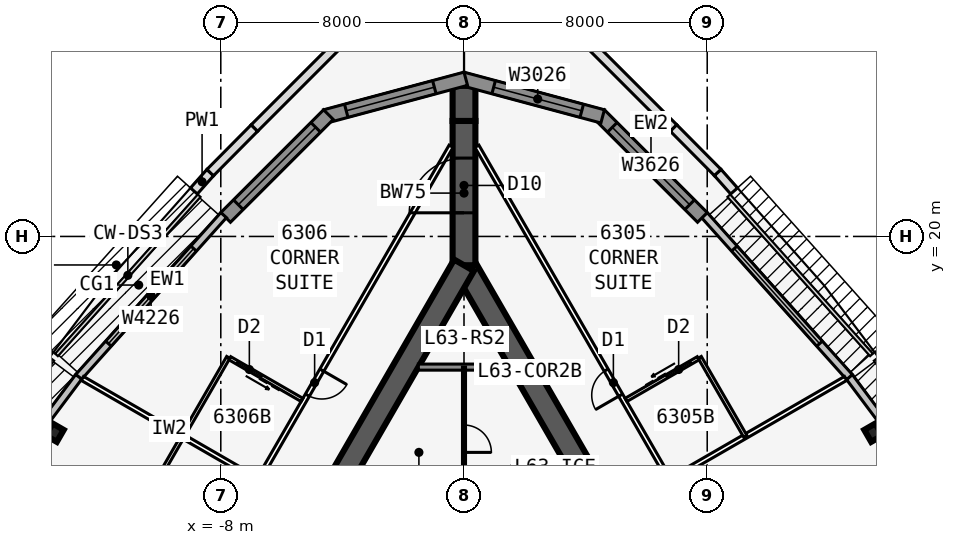
"""IFC4 building model, lengths in metres.
Left out: names, types, materials, properties, quantities, classifications, styles, units other than length and angle.
Written with IfcOpenShell. Run it as: python <this file> out.ifc"""

import sys

from ifc_helpers import new_model, si_unit, direction, frame, frame_2d, origin, origin_2d, place, context, subcontext, project, spatial, polyline, rectangle, i_section, outline, extrude, element, fill, save


model = new_model("IFC4")
c1 = context("Model", 3, precision=1e-05, world=origin(), true_north=direction((0.0, 1.0)))
c2 = subcontext(c1, "Body", "Model", "MODEL_VIEW")
j1 = project(units=[si_unit("LENGTHUNIT", "METRE"), si_unit("PLANEANGLEUNIT", "RADIAN")], contexts=[c1])
p1 = place(None, origin())
s1 = spatial("IfcSite", under=j1, at=p1, CompositionType="ELEMENT")
p2 = place(p1, origin())
s2 = spatial("IfcBuilding", under=s1, at=p2, CompositionType="ELEMENT")
p3 = place(p2, frame((0.0, 0.0, 239.3)))
s3 = spatial("IfcBuildingStorey", under=s2, at=p3, CompositionType="ELEMENT", Elevation=239.3)
p4 = place(p3, frame((16.5, -9.526, 0.0), z_axis=(0.0, 0.0, 1.0), x_axis=(-0.499999749417, 0.866025548458, 0.0)))
e1 = element("IfcWall", 1, at=p4, inside=s3, PredefinedType="SHEAR", context=c2, shape_type="SweptSolid", body=[
    extrude(rectangle(XDim=33.0, YDim=0.75, at=frame_2d((16.5, 0.0))), origin(), (0.0, 0.0, 1.0), 3.6),
])
p5 = place(p4, frame((14.15, 0.0, 0.0)))
e2 = element("IfcOpeningElement", 2, at=p5, cuts=e1, PredefinedType="OPENING", context=c2, shape_type="SweptSolid", body=[
    extrude(rectangle(XDim=1.8, YDim=2.13, at=frame_2d((0.9, 1.065))), frame((0.0, 0.385, 0.0), z_axis=(0.0, -1.0, 0.0), x_axis=(1.0, 0.0, 0.0)), (0.0, 0.0, 1.0), 0.77),
])
p6 = place(p4, frame((12.6, 0.0, 0.0)))
e3 = element("IfcOpeningElement", 3, at=p6, cuts=e1, PredefinedType="OPENING", context=c2, shape_type="SweptSolid", body=[
    extrude(rectangle(XDim=1.0, YDim=2.13, at=frame_2d((0.5, 1.065))), frame((0.0, 0.385, 0.0), z_axis=(0.0, -1.0, 0.0), x_axis=(1.0, 0.0, 0.0)), (0.0, 0.0, 1.0), 0.77),
])
p7 = place(p3, frame((0.0, 19.052, 0.0), z_axis=(0.0, 0.0, 1.0), x_axis=(-0.499999749417, -0.866025548458, 0.0)))
e4 = element("IfcWall", 4, at=p7, inside=s3, PredefinedType="SHEAR", context=c2, shape_type="SweptSolid", body=[
    extrude(rectangle(XDim=33.0, YDim=0.75, at=frame_2d((16.5, 0.0))), origin(), (0.0, 0.0, 1.0), 3.6),
])
p8 = place(p7, frame((14.15, 0.0, 0.0)))
e5 = element("IfcOpeningElement", 5, at=p8, cuts=e4, PredefinedType="OPENING", context=c2, shape_type="SweptSolid", body=[
    extrude(rectangle(XDim=1.8, YDim=2.13, at=frame_2d((0.9, 1.065))), frame((0.0, 0.385, 0.0), z_axis=(0.0, -1.0, 0.0), x_axis=(1.0, 0.0, 0.0)), (0.0, 0.0, 1.0), 0.77),
])
p9 = place(p7, frame((12.6, 0.0, 0.0)))
e6 = element("IfcOpeningElement", 6, at=p9, cuts=e4, PredefinedType="OPENING", context=c2, shape_type="SweptSolid", body=[
    extrude(rectangle(XDim=1.0, YDim=2.13, at=frame_2d((0.5, 1.065))), frame((0.0, 0.385, 0.0), z_axis=(0.0, -1.0, 0.0), x_axis=(1.0, 0.0, 0.0)), (0.0, 0.0, 1.0), 0.77),
])
p10 = place(p3, frame((0.0, 19.052, 0.0), z_axis=(0.0, 0.0, 1.0), x_axis=(0.0, 1.0, 0.0)))
e7 = element("IfcWall", 7, at=p10, inside=s3, PredefinedType="SHEAR", context=c2, shape_type="SweptSolid", body=[
    extrude(rectangle(XDim=4.746, YDim=0.75, at=frame_2d((2.373, 0.0))), origin(), (0.0, 0.0, 1.0), 3.6),
])
p11 = place(p10, frame((1.725, 0.0, 0.0)))
e8 = element("IfcOpeningElement", 8, at=p11, cuts=e7, PredefinedType="OPENING", context=c2, shape_type="SweptSolid", body=[
    extrude(rectangle(XDim=1.8, YDim=2.13, at=frame_2d((0.9, 1.065))), frame((0.0, 0.385, 0.0), z_axis=(0.0, -1.0, 0.0), x_axis=(1.0, 0.0, 0.0)), (0.0, 0.0, 1.0), 0.77),
])
p12 = place(p3, frame((0.0, 23.799, 0.0), z_axis=(0.0, 0.0, 1.0), x_axis=(0.0, 1.0, 0.0)))
e9 = element("IfcWall", 9, at=p12, inside=s3, PredefinedType="SHEAR", context=c2, shape_type="SweptSolid", body=[
    extrude(rectangle(XDim=1.155, YDim=0.75, at=frame_2d((0.577, 0.0))), origin(), (0.0, 0.0, 1.0), 3.6),
])
for number, where, z_axis, x_axis in (
    (10, (13.461, 13.545, 0.0), (0.0, 0.0, 1.0), (0.866, 0.5, 0.0)),
    (11, (-13.461, 13.545, 0.0), (0.0, 0.0, 1.0), (-0.866, 0.5, 0.0)),
):
    element("IfcColumn", number, at=place(p3, frame(where, z_axis=z_axis, x_axis=x_axis)), inside=s3, PredefinedType="COLUMN", context=c2, shape_type="SweptSolid", body=[
        extrude(i_section(OverallWidth=0.419, OverallDepth=0.455, WebThickness=0.042, FlangeThickness=0.068, at=origin_2d()), origin(), (0.0, 0.0, 1.0), 3.6),
    ])
p13 = place(p3, frame((13.881, 13.771, 0.0), z_axis=(0.0, 0.0, 1.0), x_axis=(-0.599650843534, 0.800261748335, 0.0)))
e12 = element("IfcWall", 12, at=p13, inside=s3, PredefinedType="STANDARD", context=c2, shape_type="SweptSolid", body=[
    extrude(rectangle(XDim=2.014, YDim=0.25, at=frame_2d((1.007, 0.0))), origin(), (0.0, 0.0, 1.0), 3.435),
])
p14 = place(p3, frame((12.68, 15.374, 0.0), z_axis=(0.0, 0.0, 1.0), x_axis=(-0.667303550892, 0.744785855778, 0.0)))
e13 = element("IfcWall", 13, at=p14, inside=s3, PredefinedType="STANDARD", context=c2, shape_type="SweptSolid", body=[
    extrude(rectangle(XDim=7.153, YDim=0.25, at=frame_2d((3.576, 0.0))), origin(), (0.0, 0.0, 1.0), 3.435),
])
p15 = place(p14, frame((1.476, 0.0, 0.45)))
e14 = element("IfcOpeningElement", 14, at=p15, cuts=e13, PredefinedType="OPENING", context=c2, shape_type="SweptSolid", body=[
    extrude(rectangle(XDim=4.2, YDim=2.6, at=frame_2d((2.1, 1.3))), frame((0.0, 0.135, 0.0), z_axis=(0.0, -1.0, 0.0), x_axis=(1.0, 0.0, 0.0)), (0.0, 0.0, 1.0), 0.27),
])
p16 = place(p3, frame((7.841, 20.625, 0.0), z_axis=(0.0, 0.0, 1.0), x_axis=(-0.707106781187, 0.707106781187, 0.0)))
e15 = element("IfcWall", 15, at=p16, inside=s3, PredefinedType="SOLIDWALL", context=c2, shape_type="SweptSolid", body=[
    extrude(rectangle(XDim=4.781, YDim=0.45, at=frame_2d((2.391, 0.0))), origin(), (0.0, 0.0, 1.0), 3.435),
])
p17 = place(p16, frame((0.591, 0.0, 0.45)))
e16 = element("IfcOpeningElement", 16, at=p17, cuts=e15, PredefinedType="OPENING", context=c2, shape_type="SweptSolid", body=[
    extrude(rectangle(XDim=3.6, YDim=2.6, at=frame_2d((1.8, 1.3))), frame((0.0, 0.235, 0.0), z_axis=(0.0, -1.0, 0.0), x_axis=(1.0, 0.0, 0.0)), (0.0, 0.0, 1.0), 0.47),
])
p18 = place(p3, frame((4.561, 23.948, 0.0), z_axis=(0.0, 0.0, 1.0), x_axis=(-0.965926628191, 0.258816052347, 0.0)))
e17 = element("IfcWall", 17, at=p18, inside=s3, PredefinedType="SOLIDWALL", context=c2, shape_type="SweptSolid", body=[
    extrude(outline(polyline([(4.781, 0.225), (4.722, 0.225), (4.303, 0.113), (4.273, 0.225), (0.0, 0.225), (0.0, -0.225), (4.781, -0.225), (4.781, 0.225)])), origin(), (0.0, 0.0, 1.0), 3.435),
])
p19 = place(p18, frame((0.711, 0.0, 0.45)))
e18 = element("IfcOpeningElement", 18, at=p19, cuts=e17, PredefinedType="OPENING", context=c2, shape_type="SweptSolid", body=[
    extrude(rectangle(XDim=3.0, YDim=2.6, at=frame_2d((1.5, 1.3))), frame((0.0, 0.235, 0.0), z_axis=(0.0, -1.0, 0.0), x_axis=(1.0, 0.0, 0.0)), (0.0, 0.0, 1.0), 0.47),
])
p20 = place(p3, frame((0.058, 25.186, 0.0), z_axis=(0.0, 0.0, 1.0), x_axis=(-0.965926628191, -0.258816052347, 0.0)))
e19 = element("IfcWall", 19, at=p20, inside=s3, PredefinedType="SOLIDWALL", context=c2, shape_type="SweptSolid", body=[
    extrude(outline(polyline([(4.781, 0.225), (0.509, 0.225), (0.479, 0.113), (0.059, 0.225), (0.0, 0.225), (0.0, -0.225), (4.781, -0.225), (4.781, 0.225)])), origin(), (0.0, 0.0, 1.0), 3.435),
])
p21 = place(p20, frame((1.07, 0.0, 0.45)))
e20 = element("IfcOpeningElement", 20, at=p21, cuts=e19, PredefinedType="OPENING", context=c2, shape_type="SweptSolid", body=[
    extrude(rectangle(XDim=3.0, YDim=2.6, at=frame_2d((1.5, 1.3))), frame((0.0, 0.235, 0.0), z_axis=(0.0, -1.0, 0.0), x_axis=(1.0, 0.0, 0.0)), (0.0, 0.0, 1.0), 0.47),
])
p22 = place(p3, frame((-4.46, 24.007, 0.0), z_axis=(0.0, 0.0, 1.0), x_axis=(-0.707106781187, -0.707106781187, 0.0)))
e21 = element("IfcWall", 21, at=p22, inside=s3, PredefinedType="SOLIDWALL", context=c2, shape_type="SweptSolid", body=[
    extrude(rectangle(XDim=4.781, YDim=0.45, at=frame_2d((2.391, 0.0))), origin(), (0.0, 0.0, 1.0), 3.435),
])
p23 = place(p22, frame((0.591, 0.0, 0.45)))
e22 = element("IfcOpeningElement", 22, at=p23, cuts=e21, PredefinedType="OPENING", context=c2, shape_type="SweptSolid", body=[
    extrude(rectangle(XDim=3.6, YDim=2.6, at=frame_2d((1.8, 1.3))), frame((0.0, 0.235, 0.0), z_axis=(0.0, -1.0, 0.0), x_axis=(1.0, 0.0, 0.0)), (0.0, 0.0, 1.0), 0.47),
])
p24 = place(p3, frame((-7.907, 20.701, 0.0), z_axis=(0.0, 0.0, 1.0), x_axis=(-0.667303550892, -0.744785855778, 0.0)))
e23 = element("IfcWall", 23, at=p24, inside=s3, PredefinedType="STANDARD", context=c2, shape_type="SweptSolid", body=[
    extrude(rectangle(XDim=7.153, YDim=0.25, at=frame_2d((3.576, 0.0))), origin(), (0.0, 0.0, 1.0), 3.435),
])
p25 = place(p24, frame((1.476, 0.0, 0.45)))
e24 = element("IfcOpeningElement", 24, at=p25, cuts=e23, PredefinedType="OPENING", context=c2, shape_type="SweptSolid", body=[
    extrude(rectangle(XDim=4.2, YDim=2.6, at=frame_2d((2.1, 1.3))), frame((0.0, 0.135, 0.0), z_axis=(0.0, -1.0, 0.0), x_axis=(1.0, 0.0, 0.0)), (0.0, 0.0, 1.0), 0.27),
])
p26 = place(p3, frame((-12.673, 15.382, 0.0), z_axis=(0.0, 0.0, 1.0), x_axis=(-0.599650843534, -0.800261748335, 0.0)))
e25 = element("IfcWall", 25, at=p26, inside=s3, PredefinedType="STANDARD", context=c2, shape_type="SweptSolid", body=[
    extrude(rectangle(XDim=2.014, YDim=0.25, at=frame_2d((1.007, 0.0))), origin(), (0.0, 0.0, 1.0), 3.435),
])
p27 = place(p3, frame((-8.884, 21.496, 0.0), z_axis=(0.0, 0.0, 1.0), x_axis=(0.664345086819, 0.747425986717, 0.0)))
e26 = element("IfcWall", 26, at=p27, inside=s3, PredefinedType="PARAPET", context=c2, shape_type="SweptSolid", body=[
    extrude(rectangle(XDim=0.808, YDim=0.3, at=frame_2d((0.404, 0.0))), origin(), (0.0, 0.0, 1.0), 1.1),
])
p28 = place(p3, frame((-8.347, 22.1, 0.0), z_axis=(0.0, 0.0, 1.0), x_axis=(0.704083858744, 0.710116835356, 0.0)))
e27 = element("IfcWall", 27, at=p28, inside=s3, PredefinedType="PARAPET", context=c2, shape_type="SweptSolid", body=[
    extrude(rectangle(XDim=2.064, YDim=0.3, at=frame_2d((1.032, 0.0))), origin(), (0.0, 0.0, 1.0), 1.1),
])
for number, where, z_axis, x_axis in (
    (28, (-6.894, 23.566, 0.0), (0.0, 0.0, 1.0), (0.707, 0.707, 0.0)),
    (29, (3.964, 26.495, 0.0), (0.0, 0.0, 1.0), (0.707, -0.707, 0.0)),
):
    element("IfcWall", number, at=place(p3, frame(where, z_axis=z_axis, x_axis=x_axis)), inside=s3, PredefinedType="PARAPET", context=c2, shape_type="SweptSolid", body=[
        extrude(rectangle(XDim=4.143, YDim=0.3, at=frame_2d((2.072, 0.0))), origin(), (0.0, 0.0, 1.0), 1.1),
    ])
p29 = place(p3, frame((6.894, 23.566, 0.0), z_axis=(0.0, 0.0, 1.0), x_axis=(0.704083858744, -0.710116835356, 0.0)))
e30 = element("IfcWall", 30, at=p29, inside=s3, PredefinedType="PARAPET", context=c2, shape_type="SweptSolid", body=[
    extrude(rectangle(XDim=2.064, YDim=0.3, at=frame_2d((1.032, 0.0))), origin(), (0.0, 0.0, 1.0), 1.1),
])
p30 = place(p3, frame((8.347, 22.1, 0.0), z_axis=(0.0, 0.0, 1.0), x_axis=(0.664345086819, -0.747425986717, 0.0)))
e31 = element("IfcWall", 31, at=p30, inside=s3, PredefinedType="PARAPET", context=c2, shape_type="SweptSolid", body=[
    extrude(rectangle(XDim=0.808, YDim=0.3, at=frame_2d((0.404, 0.0))), origin(), (0.0, 0.0, 1.0), 1.1),
])
p31 = place(p3, frame((6.763, 11.988, 0.0), z_axis=(0.0, 0.0, 1.0), x_axis=(-0.49999585592, 0.866027796357, 0.0)))
e32 = element("IfcWall", 32, at=p31, inside=s3, PredefinedType="PARTITIONING", context=c2, shape_type="SweptSolid", body=[
    extrude(rectangle(XDim=12.677, YDim=0.15, at=frame_2d((6.338, 0.0))), origin(), (0.0, 0.0, 1.0), 3.435),
])
p32 = place(p31, frame((3.225, 0.0, 0.0)))
e33 = element("IfcOpeningElement", 33, at=p32, cuts=e32, PredefinedType="OPENING", context=c2, shape_type="SweptSolid", body=[
    extrude(rectangle(XDim=0.95, YDim=2.13, at=frame_2d((0.475, 1.065))), frame((0.0, 0.085, 0.0), z_axis=(0.0, -1.0, 0.0), x_axis=(1.0, 0.0, 0.0)), (0.0, 0.0, 1.0), 0.17),
])
p33 = place(p3, frame((6.829, 12.025, 0.0), z_axis=(0.0, 0.0, 1.0), x_axis=(0.866029323189, 0.499993211332, 0.0)))
e34 = element("IfcWall", 34, at=p33, inside=s3, PredefinedType="PARTITIONING", context=c2, shape_type="SweptSolid", body=[
    extrude(rectangle(XDim=6.608, YDim=0.15, at=frame_2d((3.304, 0.0))), origin(), (0.0, 0.0, 1.0), 2.678),
])
p34 = place(p3, frame((9.253, 13.425, 0.0), z_axis=(0.0, 0.0, 1.0), x_axis=(-0.499990139034, 0.866031096941, 0.0)))
e35 = element("IfcWall", 35, at=p34, inside=s3, PredefinedType="PLUMBINGWALL", context=c2, shape_type="SweptSolid", body=[
    extrude(rectangle(XDim=3.0, YDim=0.12, at=frame_2d((1.5, 0.0))), origin(), (0.0, 0.0, 1.0), 3.435),
])
p35 = place(p3, frame((5.329, 14.623, 0.0), z_axis=(0.0, 0.0, 1.0), x_axis=(0.865997131366, 0.500048966069, 0.0)))
e36 = element("IfcWall", 36, at=p35, inside=s3, PredefinedType="PLUMBINGWALL", context=c2, shape_type="SweptSolid", body=[
    extrude(rectangle(XDim=2.74, YDim=0.12, at=frame_2d((1.37, 0.0))), origin(), (0.0, 0.0, 1.0), 3.435),
])
p36 = place(p35, frame((1.55, 0.0, 0.0)))
e37 = element("IfcOpeningElement", 37, at=p36, cuts=e36, PredefinedType="OPENING", context=c2, shape_type="SweptSolid", body=[
    extrude(rectangle(XDim=0.9, YDim=2.13, at=frame_2d((0.45, 1.065))), frame((0.0, 0.07, 0.0), z_axis=(0.0, -1.0, 0.0), x_axis=(1.0, 0.0, 0.0)), (0.0, 0.0, 1.0), 0.14),
])
p37 = place(p3, frame((-0.425, 22.966, 0.0), z_axis=(0.0, 0.0, 1.0), x_axis=(-0.500000265775, -0.866025250339, 0.0)))
e38 = element("IfcWall", 38, at=p37, inside=s3, PredefinedType="PARTITIONING", context=c2, shape_type="SweptSolid", body=[
    extrude(rectangle(XDim=39.354, YDim=0.15, at=frame_2d((19.677, 0.0))), origin(), (0.0, 0.0, 1.0), 3.435),
])
p38 = place(p37, frame((8.502, 0.0, 0.0)))
e39 = element("IfcOpeningElement", 39, at=p38, cuts=e38, PredefinedType="OPENING", context=c2, shape_type="SweptSolid", body=[
    extrude(rectangle(XDim=0.95, YDim=2.13, at=frame_2d((0.475, 1.065))), frame((0.0, 0.085, 0.0), z_axis=(0.0, -1.0, 0.0), x_axis=(1.0, 0.0, 0.0)), (0.0, 0.0, 1.0), 0.17),
])
p39 = place(p37, frame((15.902, 0.0, 0.0)))
e40 = element("IfcOpeningElement", 40, at=p39, cuts=e38, PredefinedType="OPENING", context=c2, shape_type="SweptSolid", body=[
    extrude(rectangle(XDim=0.95, YDim=2.13, at=frame_2d((0.475, 1.065))), frame((0.0, 0.085, 0.0), z_axis=(0.0, -1.0, 0.0), x_axis=(1.0, 0.0, 0.0)), (0.0, 0.0, 1.0), 0.17),
])
p40 = place(p37, frame((22.902, 0.0, 0.0)))
e41 = element("IfcOpeningElement", 41, at=p40, cuts=e38, PredefinedType="OPENING", context=c2, shape_type="SweptSolid", body=[
    extrude(rectangle(XDim=0.95, YDim=2.13, at=frame_2d((0.475, 1.065))), frame((0.0, 0.085, 0.0), z_axis=(0.0, -1.0, 0.0), x_axis=(1.0, 0.0, 0.0)), (0.0, 0.0, 1.0), 0.17),
])
p41 = place(p37, frame((29.902, 0.0, 0.0)))
e42 = element("IfcOpeningElement", 42, at=p41, cuts=e38, PredefinedType="OPENING", context=c2, shape_type="SweptSolid", body=[
    extrude(rectangle(XDim=0.95, YDim=2.13, at=frame_2d((0.475, 1.065))), frame((0.0, 0.085, 0.0), z_axis=(0.0, -1.0, 0.0), x_axis=(1.0, 0.0, 0.0)), (0.0, 0.0, 1.0), 0.17),
])
p42 = place(p3, frame((-6.829, 12.025, 0.0), z_axis=(0.0, 0.0, 1.0), x_axis=(-0.866029323189, 0.499993211332, 0.0)))
e43 = element("IfcWall", 43, at=p42, inside=s3, PredefinedType="PARTITIONING", context=c2, shape_type="SweptSolid", body=[
    extrude(rectangle(XDim=6.608, YDim=0.15, at=frame_2d((3.304, 0.0))), origin(), (0.0, 0.0, 1.0), 2.678),
])
p43 = place(p3, frame((-7.753, 16.023, 0.0), z_axis=(0.0, 0.0, 1.0), x_axis=(-0.499990139034, -0.866031096941, 0.0)))
e44 = element("IfcWall", 44, at=p43, inside=s3, PredefinedType="PLUMBINGWALL", context=c2, shape_type="SweptSolid", body=[
    extrude(rectangle(XDim=3.0, YDim=0.12, at=frame_2d((1.5, 0.0))), origin(), (0.0, 0.0, 1.0), 3.435),
])
p44 = place(p3, frame((-5.329, 14.623, 0.0), z_axis=(0.0, 0.0, 1.0), x_axis=(-0.865997131366, 0.500048966069, 0.0)))
e45 = element("IfcWall", 45, at=p44, inside=s3, PredefinedType="PLUMBINGWALL", context=c2, shape_type="SweptSolid", body=[
    extrude(rectangle(XDim=2.74, YDim=0.12, at=frame_2d((1.37, 0.0))), origin(), (0.0, 0.0, 1.0), 3.435),
])
p45 = place(p44, frame((1.55, 0.0, 0.0)))
e46 = element("IfcOpeningElement", 46, at=p45, cuts=e45, PredefinedType="OPENING", context=c2, shape_type="SweptSolid", body=[
    extrude(rectangle(XDim=0.9, YDim=2.13, at=frame_2d((0.45, 1.065))), frame((0.0, 0.07, 0.0), z_axis=(0.0, -1.0, 0.0), x_axis=(1.0, 0.0, 0.0)), (0.0, 0.0, 1.0), 0.14),
])
p46 = place(p3, frame((-9.253, 13.425, 0.0), z_axis=(0.0, 0.0, 1.0), x_axis=(-0.499990139034, -0.866031096941, 0.0)))
e47 = element("IfcWall", 47, at=p46, inside=s3, PredefinedType="PLUMBINGWALL", context=c2, shape_type="SweptSolid", body=[
    extrude(rectangle(XDim=3.0, YDim=0.12, at=frame_2d((1.5, 0.0))), origin(), (0.0, 0.0, 1.0), 3.435),
])
p47 = place(p3, frame((-1.501, 15.703, 0.0), z_axis=(0.0, 0.0, 1.0), x_axis=(1.0, 0.0, 0.0)))
e48 = element("IfcWall", 48, at=p47, inside=s3, PredefinedType="SOLIDWALL", context=c2, shape_type="SweptSolid", body=[
    extrude(rectangle(XDim=3.002, YDim=0.2, at=frame_2d((1.501, 0.0))), origin(), (0.0, 0.0, 1.0), 3.435),
])
p48 = place(p3, frame((0.0, 15.703, 0.0), z_axis=(0.0, 0.0, 1.0), x_axis=(0.0, -1.0, 0.0)))
e49 = element("IfcWall", 49, at=p48, inside=s3, PredefinedType="PARTITIONING", context=c2, shape_type="SweptSolid", body=[
    extrude(rectangle(XDim=3.925, YDim=0.1, at=frame_2d((1.963, 0.0))), origin(), (0.0, 0.0, 1.0), 3.435),
])
p49 = place(p48, frame((1.905, 0.0, 0.0)))
e50 = element("IfcOpeningElement", 50, at=p49, cuts=e49, PredefinedType="OPENING", context=c2, shape_type="SweptSolid", body=[
    extrude(rectangle(XDim=0.9, YDim=2.13, at=frame_2d((0.45, 1.065))), frame((0.0, 0.06, 0.0), z_axis=(0.0, -1.0, 0.0), x_axis=(1.0, 0.0, 0.0)), (0.0, 0.0, 1.0), 0.12),
])
p50 = place(p15, origin())
e51 = element("IfcWindow", 51, at=p50, inside=s3, PartitioningType="SINGLE_PANEL", PredefinedType="WINDOW", context=c2, shape_type="SweptSolid", body=[
    extrude(rectangle(XDim=4.2, YDim=2.6, at=frame_2d((2.1, 1.3))), frame((0.0, 0.03, 0.0), z_axis=(0.0, -1.0, 0.0), x_axis=(1.0, 0.0, 0.0)), (0.0, 0.0, 1.0), 0.06),
])
fill(e14, e51)
p51 = place(p17, origin())
e52 = element("IfcWindow", 52, at=p51, inside=s3, PartitioningType="SINGLE_PANEL", PredefinedType="WINDOW", context=c2, shape_type="SweptSolid", body=[
    extrude(rectangle(XDim=3.6, YDim=2.6, at=frame_2d((1.8, 1.3))), frame((0.0, 0.03, 0.0), z_axis=(0.0, -1.0, 0.0), x_axis=(1.0, 0.0, 0.0)), (0.0, 0.0, 1.0), 0.06),
])
fill(e16, e52)
p52 = place(p19, origin())
e53 = element("IfcWindow", 53, at=p52, inside=s3, PartitioningType="SINGLE_PANEL", PredefinedType="WINDOW", context=c2, shape_type="SweptSolid", body=[
    extrude(rectangle(XDim=3.0, YDim=2.6, at=frame_2d((1.5, 1.3))), frame((0.0, 0.03, 0.0), z_axis=(0.0, -1.0, 0.0), x_axis=(1.0, 0.0, 0.0)), (0.0, 0.0, 1.0), 0.06),
])
fill(e18, e53)
p53 = place(p21, origin())
e54 = element("IfcWindow", 54, at=p53, inside=s3, PartitioningType="SINGLE_PANEL", PredefinedType="WINDOW", context=c2, shape_type="SweptSolid", body=[
    extrude(rectangle(XDim=3.0, YDim=2.6, at=frame_2d((1.5, 1.3))), frame((0.0, 0.03, 0.0), z_axis=(0.0, -1.0, 0.0), x_axis=(1.0, 0.0, 0.0)), (0.0, 0.0, 1.0), 0.06),
])
fill(e20, e54)
p54 = place(p23, origin())
e55 = element("IfcWindow", 55, at=p54, inside=s3, PartitioningType="SINGLE_PANEL", PredefinedType="WINDOW", context=c2, shape_type="SweptSolid", body=[
    extrude(rectangle(XDim=3.6, YDim=2.6, at=frame_2d((1.8, 1.3))), frame((0.0, 0.03, 0.0), z_axis=(0.0, -1.0, 0.0), x_axis=(1.0, 0.0, 0.0)), (0.0, 0.0, 1.0), 0.06),
])
fill(e22, e55)
p55 = place(p25, origin())
e56 = element("IfcWindow", 56, at=p55, inside=s3, PartitioningType="SINGLE_PANEL", PredefinedType="WINDOW", context=c2, shape_type="SweptSolid", body=[
    extrude(rectangle(XDim=4.2, YDim=2.6, at=frame_2d((2.1, 1.3))), frame((0.0, 0.03, 0.0), z_axis=(0.0, -1.0, 0.0), x_axis=(1.0, 0.0, 0.0)), (0.0, 0.0, 1.0), 0.06),
])
fill(e24, e56)
p56 = place(p36, origin())
e57 = element("IfcDoor", 57, at=p56, inside=s3, OperationType="SLIDING_TO_LEFT", PredefinedType="DOOR", context=c2, shape_type="SweptSolid", body=[
    extrude(rectangle(XDim=0.9, YDim=2.13, at=frame_2d((0.45, 1.065))), frame((0.0, 0.025, 0.0), z_axis=(0.0, -1.0, 0.0), x_axis=(1.0, 0.0, 0.0)), (0.0, 0.0, 1.0), 0.05),
])
fill(e37, e57)
p57 = place(p32, origin())
e58 = element("IfcDoor", 58, at=p57, inside=s3, OperationType="SINGLE_SWING_LEFT", PredefinedType="DOOR", context=c2, shape_type="SweptSolid", body=[
    extrude(rectangle(XDim=0.95, YDim=2.13, at=frame_2d((0.475, 1.065))), frame((0.0, 0.025, 0.0), z_axis=(0.0, -1.0, 0.0), x_axis=(1.0, 0.0, 0.0)), (0.0, 0.0, 1.0), 0.05),
])
fill(e33, e58)
p58 = place(p45, origin())
e59 = element("IfcDoor", 59, at=p58, inside=s3, OperationType="SLIDING_TO_LEFT", PredefinedType="DOOR", context=c2, shape_type="SweptSolid", body=[
    extrude(rectangle(XDim=0.9, YDim=2.13, at=frame_2d((0.45, 1.065))), frame((0.0, 0.025, 0.0), z_axis=(0.0, -1.0, 0.0), x_axis=(1.0, 0.0, 0.0)), (0.0, 0.0, 1.0), 0.05),
])
fill(e46, e59)
p59 = place(p38, origin())
e60 = element("IfcDoor", 60, at=p59, inside=s3, OperationType="SINGLE_SWING_LEFT", PredefinedType="DOOR", context=c2, shape_type="SweptSolid", body=[
    extrude(rectangle(XDim=0.95, YDim=2.13, at=frame_2d((0.475, 1.065))), frame((0.0, 0.025, 0.0), z_axis=(0.0, -1.0, 0.0), x_axis=(1.0, 0.0, 0.0)), (0.0, 0.0, 1.0), 0.05),
])
fill(e39, e60)
p60 = place(p11, origin())
e61 = element("IfcDoor", 61, at=p60, inside=s3, OperationType="DOUBLE_DOOR_DOUBLE_SWING", PredefinedType="DOOR", context=c2, shape_type="SweptSolid", body=[
    extrude(rectangle(XDim=1.8, YDim=2.13, at=frame_2d((0.9, 1.065))), frame((0.0, 0.025, 0.0), z_axis=(0.0, -1.0, 0.0), x_axis=(1.0, 0.0, 0.0)), (0.0, 0.0, 1.0), 0.05),
])
fill(e8, e61)
p61 = place(p49, origin())
e62 = element("IfcDoor", 62, at=p61, inside=s3, OperationType="SINGLE_SWING_RIGHT", PredefinedType="DOOR", context=c2, shape_type="SweptSolid", body=[
    extrude(rectangle(XDim=0.9, YDim=2.13, at=frame_2d((0.45, 1.065))), frame((0.0, 0.025, 0.0), z_axis=(0.0, -1.0, 0.0), x_axis=(1.0, 0.0, 0.0)), (0.0, 0.0, 1.0), 0.05),
])
fill(e50, e62)
save(model, sys.argv[1])
